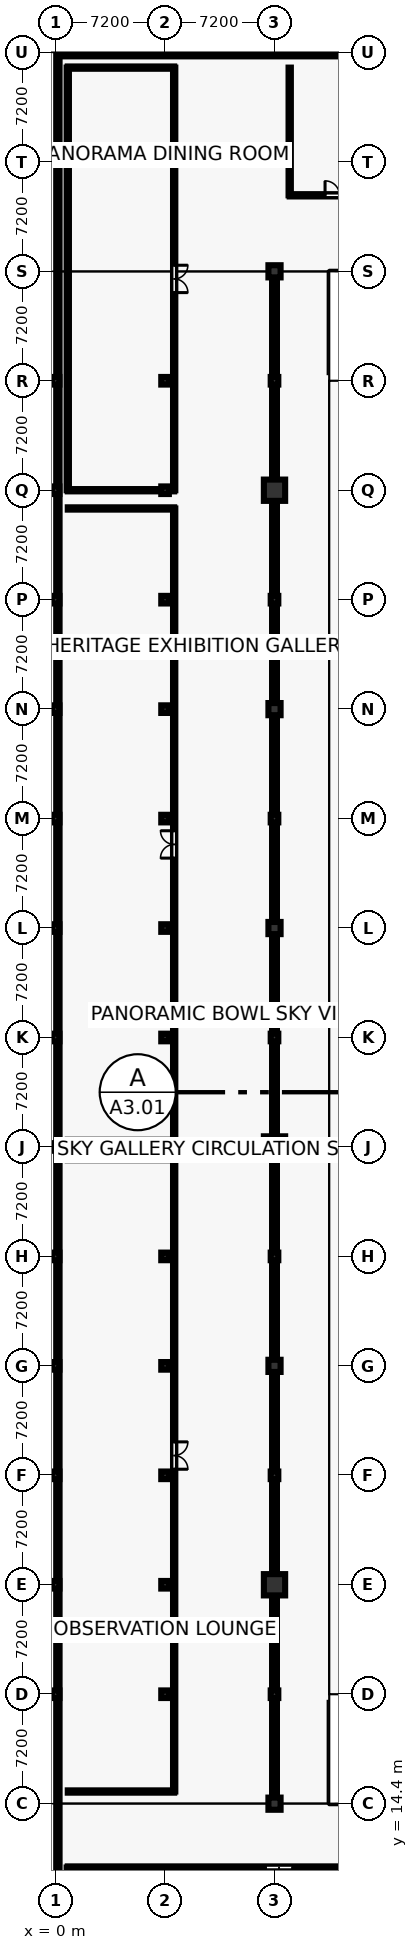
"""IFC4 building model, lengths in metres.
Left out: names, types, materials, properties, quantities, classifications, styles, units other than length and angle.
Written with IfcOpenShell. Run it as: python <this file> out.ifc"""

import sys

from ifc_helpers import new_model, si_unit, direction, frame, frame_2d, origin, origin_2d, place, context, subcontext, project, spatial, rectangle, circle, extrude, element, fill, save


model = new_model("IFC4")
c1 = context("Model", 3, precision=1e-05, world=origin(), true_north=direction((0.0, 1.0)))
c2 = subcontext(c1, "Body", "Model", "MODEL_VIEW")
j1 = project(units=[si_unit("LENGTHUNIT", "METRE"), si_unit("PLANEANGLEUNIT", "RADIAN")], contexts=[c1])
p1 = place(None, origin())
s1 = spatial("IfcSite", under=j1, at=p1, CompositionType="ELEMENT")
p2 = place(p1, origin())
s2 = spatial("IfcBuilding", under=s1, at=p2, CompositionType="ELEMENT")
p3 = place(p2, frame((0.0, 0.0, 23.0)))
s3 = spatial("IfcBuildingStorey", under=s2, at=p3, CompositionType="ELEMENT", Elevation=23.0)
for number, where, z_axis, x_axis in (
    (1, (0.0, 21.6, 0.0), (0.0, 0.0, 1.0), (1.0, 0.0, 0.0)),
    (2, (0.0, 28.8, 0.0), (0.0, 0.0, 1.0), (1.0, 0.0, 0.0)),
    (3, (0.0, 36.0, 0.0), (0.0, 0.0, 1.0), (1.0, 0.0, 0.0)),
    (4, (0.0, 43.2, 0.0), (0.0, 0.0, 1.0), (1.0, 0.0, 0.0)),
    (5, (0.0, 50.4, 0.0), (0.0, 0.0, 1.0), (1.0, 0.0, 0.0)),
    (6, (0.0, 57.6, 0.0), (0.0, 0.0, 1.0), (1.0, 0.0, 0.0)),
    (7, (0.0, 64.8, 0.0), (0.0, 0.0, 1.0), (1.0, 0.0, 0.0)),
    (8, (0.0, 72.0, 0.0), (0.0, 0.0, 1.0), (1.0, 0.0, 0.0)),
    (9, (0.0, 79.2, 0.0), (0.0, 0.0, 1.0), (1.0, 0.0, 0.0)),
    (10, (0.0, 86.4, 0.0), (0.0, 0.0, 1.0), (1.0, 0.0, 0.0)),
    (11, (0.0, 93.6, 0.0), (0.0, 0.0, 1.0), (1.0, 0.0, 0.0)),
    (12, (0.0, 100.8, 0.0), (0.0, 0.0, 1.0), (1.0, 0.0, 0.0)),
    (13, (0.0, 108.0, 0.0), (0.0, 0.0, 1.0), (1.0, 0.0, 0.0)),
    (14, (7.2, 21.6, 0.0), (0.0, 0.0, 1.0), (1.0, 0.0, 0.0)),
    (15, (7.2, 28.8, 0.0), (0.0, 0.0, 1.0), (1.0, 0.0, 0.0)),
    (16, (7.2, 36.0, 0.0), (0.0, 0.0, 1.0), (1.0, 0.0, 0.0)),
    (17, (7.2, 43.2, 0.0), (0.0, 0.0, 1.0), (1.0, 0.0, 0.0)),
    (18, (7.2, 50.4, 0.0), (0.0, 0.0, 1.0), (1.0, 0.0, 0.0)),
    (19, (7.2, 57.6, 0.0), (0.0, 0.0, 1.0), (1.0, 0.0, 0.0)),
    (20, (7.2, 64.8, 0.0), (0.0, 0.0, 1.0), (1.0, 0.0, 0.0)),
    (21, (7.2, 72.0, 0.0), (0.0, 0.0, 1.0), (1.0, 0.0, 0.0)),
    (22, (7.2, 79.2, 0.0), (0.0, 0.0, 1.0), (1.0, 0.0, 0.0)),
    (23, (7.2, 86.4, 0.0), (0.0, 0.0, 1.0), (1.0, 0.0, 0.0)),
    (24, (7.2, 93.6, 0.0), (0.0, 0.0, 1.0), (1.0, 0.0, 0.0)),
    (25, (7.2, 100.8, 0.0), (0.0, 0.0, 1.0), (1.0, 0.0, 0.0)),
    (26, (7.2, 108.0, 0.0), (0.0, 0.0, 1.0), (1.0, 0.0, 0.0)),
):
    element("IfcColumn", number, at=place(p3, frame(where, z_axis=z_axis, x_axis=x_axis)), inside=s3, PredefinedType="COLUMN", context=c2, shape_type="SweptSolid", body=[
        extrude(rectangle(XDim=0.5, YDim=0.5, at=origin_2d()), origin(), (0.0, 0.0, 1.0), 4.5),
    ])
p4 = place(p3, frame((14.4, 14.4, 0.0), z_axis=(0.0, 0.0, 1.0), x_axis=(1.0, 0.0, 0.0)))
e27 = element("IfcColumn", 27, at=p4, inside=s3, PredefinedType="COLUMN", context=c2, shape_type="SweptSolid", body=[
    extrude(circle(Radius=0.4, at=origin_2d()), origin(), (0.0, 0.0, 1.0), 5.92),
])
p5 = place(p3, frame((14.4, 21.6, 0.0), z_axis=(0.0, 0.0, 1.0), x_axis=(1.0, 0.0, 0.0)))
e28 = element("IfcColumn", 28, at=p5, inside=s3, PredefinedType="COLUMN", context=c2, shape_type="SweptSolid", body=[
    extrude(rectangle(XDim=0.5, YDim=0.5, at=origin_2d()), origin(), (0.0, 0.0, 1.0), 4.5),
])
p6 = place(p3, frame((14.4, 28.8, 0.0), z_axis=(0.0, 0.0, 1.0), x_axis=(1.0, 0.0, 0.0)))
e29 = element("IfcColumn", 29, at=p6, inside=s3, PredefinedType="COLUMN", context=c2, shape_type="SweptSolid", body=[
    extrude(circle(Radius=0.7, at=origin_2d()), origin(), (0.0, 0.0, 1.0), 4.75),
])
p7 = place(p3, frame((14.4, 36.0, 0.0), z_axis=(0.0, 0.0, 1.0), x_axis=(1.0, 0.0, 0.0)))
e30 = element("IfcColumn", 30, at=p7, inside=s3, PredefinedType="COLUMN", context=c2, shape_type="SweptSolid", body=[
    extrude(rectangle(XDim=0.5, YDim=0.5, at=origin_2d()), origin(), (0.0, 0.0, 1.0), 4.5),
])
p8 = place(p3, frame((14.4, 43.2, 0.0), z_axis=(0.0, 0.0, 1.0), x_axis=(1.0, 0.0, 0.0)))
e31 = element("IfcColumn", 31, at=p8, inside=s3, PredefinedType="COLUMN", context=c2, shape_type="SweptSolid", body=[
    extrude(circle(Radius=0.4, at=origin_2d()), origin(), (0.0, 0.0, 1.0), 4.75),
])
p9 = place(p3, frame((14.4, 50.4, 0.0), z_axis=(0.0, 0.0, 1.0), x_axis=(1.0, 0.0, 0.0)))
e32 = element("IfcColumn", 32, at=p9, inside=s3, PredefinedType="COLUMN", context=c2, shape_type="SweptSolid", body=[
    extrude(rectangle(XDim=0.5, YDim=0.5, at=origin_2d()), origin(), (0.0, 0.0, 1.0), 4.5),
])
p10 = place(p3, frame((14.4, 57.6, 0.0), z_axis=(0.0, 0.0, 1.0), x_axis=(1.0, 0.0, 0.0)))
e33 = element("IfcColumn", 33, at=p10, inside=s3, PredefinedType="COLUMN", context=c2, shape_type="SweptSolid", body=[
    extrude(circle(Radius=0.7, at=origin_2d()), origin(), (0.0, 0.0, 1.0), 4.75),
])
p11 = place(p3, frame((14.4, 64.8, 0.0), z_axis=(0.0, 0.0, 1.0), x_axis=(1.0, 0.0, 0.0)))
e34 = element("IfcColumn", 34, at=p11, inside=s3, PredefinedType="COLUMN", context=c2, shape_type="SweptSolid", body=[
    extrude(rectangle(XDim=0.5, YDim=0.5, at=origin_2d()), origin(), (0.0, 0.0, 1.0), 4.5),
])
p12 = place(p3, frame((14.4, 72.0, 0.0), z_axis=(0.0, 0.0, 1.0), x_axis=(1.0, 0.0, 0.0)))
e35 = element("IfcColumn", 35, at=p12, inside=s3, PredefinedType="COLUMN", context=c2, shape_type="SweptSolid", body=[
    extrude(circle(Radius=0.4, at=origin_2d()), origin(), (0.0, 0.0, 1.0), 4.75),
])
p13 = place(p3, frame((14.4, 79.2, 0.0), z_axis=(0.0, 0.0, 1.0), x_axis=(1.0, 0.0, 0.0)))
e36 = element("IfcColumn", 36, at=p13, inside=s3, PredefinedType="COLUMN", context=c2, shape_type="SweptSolid", body=[
    extrude(rectangle(XDim=0.5, YDim=0.5, at=origin_2d()), origin(), (0.0, 0.0, 1.0), 4.5),
])
p14 = place(p3, frame((14.4, 86.4, 0.0), z_axis=(0.0, 0.0, 1.0), x_axis=(1.0, 0.0, 0.0)))
e37 = element("IfcColumn", 37, at=p14, inside=s3, PredefinedType="COLUMN", context=c2, shape_type="SweptSolid", body=[
    extrude(circle(Radius=0.4, at=origin_2d()), origin(), (0.0, 0.0, 1.0), 4.75),
])
p15 = place(p3, frame((14.4, 93.6, 0.0), z_axis=(0.0, 0.0, 1.0), x_axis=(1.0, 0.0, 0.0)))
e38 = element("IfcColumn", 38, at=p15, inside=s3, PredefinedType="COLUMN", context=c2, shape_type="SweptSolid", body=[
    extrude(rectangle(XDim=0.5, YDim=0.5, at=origin_2d()), origin(), (0.0, 0.0, 1.0), 4.5),
])
p16 = place(p3, frame((14.4, 100.8, 0.0), z_axis=(0.0, 0.0, 1.0), x_axis=(1.0, 0.0, 0.0)))
e39 = element("IfcColumn", 39, at=p16, inside=s3, PredefinedType="COLUMN", context=c2, shape_type="SweptSolid", body=[
    extrude(circle(Radius=0.7, at=origin_2d()), origin(), (0.0, 0.0, 1.0), 4.75),
])
p17 = place(p3, frame((14.4, 108.0, 0.0), z_axis=(0.0, 0.0, 1.0), x_axis=(1.0, 0.0, 0.0)))
e40 = element("IfcColumn", 40, at=p17, inside=s3, PredefinedType="COLUMN", context=c2, shape_type="SweptSolid", body=[
    extrude(rectangle(XDim=0.5, YDim=0.5, at=origin_2d()), origin(), (0.0, 0.0, 1.0), 4.5),
])
p18 = place(p3, frame((14.4, 115.2, 0.0), z_axis=(0.0, 0.0, 1.0), x_axis=(1.0, 0.0, 0.0)))
e41 = element("IfcColumn", 41, at=p18, inside=s3, PredefinedType="COLUMN", context=c2, shape_type="SweptSolid", body=[
    extrude(circle(Radius=0.4, at=origin_2d()), origin(), (0.0, 0.0, 1.0), 5.92),
])
p19 = place(p3, frame((14.4, 14.75, 0.0), z_axis=(0.0, 0.0, 1.0), x_axis=(0.0, 1.0, 0.0)))
e42 = element("IfcWall", 42, at=p19, inside=s3, PredefinedType="SOLIDWALL", context=c2, shape_type="SweptSolid", body=[
    extrude(rectangle(XDim=13.7, YDim=0.32, at=frame_2d((6.85, 0.0))), origin(), (0.0, 0.0, 1.0), 3.34),
])
p20 = place(p3, frame((14.4, 29.15, 0.0), z_axis=(0.0, 0.0, 1.0), x_axis=(0.0, 1.0, 0.0)))
e43 = element("IfcWall", 43, at=p20, inside=s3, PredefinedType="SOLIDWALL", context=c2, shape_type="SweptSolid", body=[
    extrude(rectangle(XDim=13.7, YDim=0.32, at=frame_2d((6.85, 0.0))), origin(), (0.0, 0.0, 1.0), 3.34),
])
for number, where, z_axis, x_axis in (
    (44, (14.4, 43.55, 0.0), (0.0, 0.0, 1.0), (0.0, 1.0, 0.0)),
    (45, (14.4, 57.95, 0.0), (0.0, 0.0, 1.0), (0.0, 1.0, 0.0)),
    (46, (14.4, 72.35, 0.0), (0.0, 0.0, 1.0), (0.0, 1.0, 0.0)),
    (47, (14.4, 86.75, 0.0), (0.0, 0.0, 1.0), (0.0, 1.0, 0.0)),
):
    element("IfcWall", number, at=place(p3, frame(where, z_axis=z_axis, x_axis=x_axis)), inside=s3, PredefinedType="SOLIDWALL", context=c2, shape_type="SweptSolid", body=[
        extrude(rectangle(XDim=13.7, YDim=0.32, at=frame_2d((6.85, 0.0))), origin(), (0.0, 0.0, 1.0), 3.34),
    ])
p21 = place(p3, frame((14.4, 101.15, 0.0), z_axis=(0.0, 0.0, 1.0), x_axis=(0.0, 1.0, 0.0)))
e48 = element("IfcWall", 48, at=p21, inside=s3, PredefinedType="SOLIDWALL", context=c2, shape_type="SweptSolid", body=[
    extrude(rectangle(XDim=13.7, YDim=0.32, at=frame_2d((6.85, 0.0))), origin(), (0.0, 0.0, 1.0), 3.34),
])
p22 = place(p3, frame((0.15, 0.15, 4.5), z_axis=(0.0, 0.0, 1.0), x_axis=(0.0, 1.0, 0.0)))
e49 = element("IfcWall", 49, at=p22, inside=s3, PredefinedType="PARAPET", context=c2, shape_type="SweptSolid", body=[
    extrude(rectangle(XDim=129.3, YDim=0.22, at=frame_2d((64.65, 0.0))), origin(), (0.0, 0.0, 1.0), 1.15),
])
p23 = place(p3, frame((0.15, 129.45, 4.5), z_axis=(0.0, 0.0, 1.0), x_axis=(1.0, 0.0, 0.0)))
e50 = element("IfcWall", 50, at=p23, inside=s3, PredefinedType="PARAPET", context=c2, shape_type="SweptSolid", body=[
    extrude(rectangle(XDim=93.3, YDim=0.22, at=frame_2d((46.65, 0.0))), origin(), (0.0, 0.0, 1.0), 1.15),
])
p24 = place(p3, frame((0.8, 15.2, 0.0), z_axis=(0.0, 0.0, 1.0), x_axis=(1.0, 0.0, 0.0)))
e51 = element("IfcWall", 51, at=p24, inside=s3, PredefinedType="PARTITIONING", context=c2, shape_type="SweptSolid", body=[
    extrude(rectangle(XDim=7.0, YDim=0.15, at=frame_2d((3.5, 0.0))), origin(), (0.0, 0.0, 1.0), 3.34),
])
p25 = place(p3, frame((7.8, 15.2, 0.0), z_axis=(0.0, 0.0, 1.0), x_axis=(0.0, 1.0, 0.0)))
e52 = element("IfcWall", 52, at=p25, inside=s3, PredefinedType="PARTITIONING", context=c2, shape_type="SweptSolid", body=[
    extrude(rectangle(XDim=41.6, YDim=0.15, at=frame_2d((20.8, 0.0))), origin(), (0.0, 0.0, 1.0), 3.34),
])
p26 = place(p25, frame((21.2, 0.0, 0.0)))
e53 = element("IfcOpeningElement", 53, at=p26, cuts=e52, PredefinedType="OPENING", context=c2, shape_type="SweptSolid", body=[
    extrude(rectangle(XDim=1.8, YDim=2.3, at=frame_2d((0.9, 1.15))), frame((0.0, 0.085, 0.0), z_axis=(0.0, -1.0, 0.0), x_axis=(1.0, 0.0, 0.0)), (0.0, 0.0, 1.0), 0.17),
])
for number, where, z_axis, x_axis in (
    (54, (7.8, 56.8, 0.0), (0.0, 0.0, 1.0), (-1.0, 0.0, 0.0)),
    (55, (0.8, 58.0, 0.0), (0.0, 0.0, 1.0), (1.0, 0.0, 0.0)),
):
    element("IfcWall", number, at=place(p3, frame(where, z_axis=z_axis, x_axis=x_axis)), inside=s3, PredefinedType="PARTITIONING", context=c2, shape_type="SweptSolid", body=[
        extrude(rectangle(XDim=7.0, YDim=0.15, at=frame_2d((3.5, 0.0))), origin(), (0.0, 0.0, 1.0), 3.34),
    ])
p27 = place(p3, frame((7.8, 58.0, 0.0), z_axis=(0.0, 0.0, 1.0), x_axis=(0.0, 1.0, 0.0)))
e56 = element("IfcWall", 56, at=p27, inside=s3, PredefinedType="PARTITIONING", context=c2, shape_type="SweptSolid", body=[
    extrude(rectangle(XDim=41.6, YDim=0.15, at=frame_2d((20.8, 0.0))), origin(), (0.0, 0.0, 1.0), 3.34),
])
p28 = place(p27, frame((18.6, 0.0, 0.0)))
e57 = element("IfcOpeningElement", 57, at=p28, cuts=e56, PredefinedType="OPENING", context=c2, shape_type="SweptSolid", body=[
    extrude(rectangle(XDim=1.8, YDim=2.3, at=frame_2d((0.9, 1.15))), frame((0.0, 0.085, 0.0), z_axis=(0.0, -1.0, 0.0), x_axis=(1.0, 0.0, 0.0)), (0.0, 0.0, 1.0), 0.17),
])
for number, where, z_axis, x_axis in (
    (58, (7.8, 99.6, 0.0), (0.0, 0.0, 1.0), (-1.0, 0.0, 0.0)),
    (59, (0.8, 100.8, 0.0), (0.0, 0.0, 1.0), (1.0, 0.0, 0.0)),
):
    element("IfcWall", number, at=place(p3, frame(where, z_axis=z_axis, x_axis=x_axis)), inside=s3, PredefinedType="PARTITIONING", context=c2, shape_type="SweptSolid", body=[
        extrude(rectangle(XDim=7.0, YDim=0.15, at=frame_2d((3.5, 0.0))), origin(), (0.0, 0.0, 1.0), 3.34),
    ])
p29 = place(p3, frame((7.8, 100.8, 0.0), z_axis=(0.0, 0.0, 1.0), x_axis=(0.0, 1.0, 0.0)))
e60 = element("IfcWall", 60, at=p29, inside=s3, PredefinedType="PARTITIONING", context=c2, shape_type="SweptSolid", body=[
    extrude(rectangle(XDim=27.8, YDim=0.15, at=frame_2d((13.9, 0.0))), origin(), (0.0, 0.0, 1.0), 3.34),
])
p30 = place(p29, frame((13.0, 0.0, 0.0)))
e61 = element("IfcOpeningElement", 61, at=p30, cuts=e60, PredefinedType="OPENING", context=c2, shape_type="SweptSolid", body=[
    extrude(rectangle(XDim=1.8, YDim=2.3, at=frame_2d((0.9, 1.15))), frame((0.0, 0.085, 0.0), z_axis=(0.0, -1.0, 0.0), x_axis=(1.0, 0.0, 0.0)), (0.0, 0.0, 1.0), 0.17),
])
p31 = place(p3, frame((7.8, 128.6, 0.0), z_axis=(0.0, 0.0, 1.0), x_axis=(-1.0, 0.0, 0.0)))
e62 = element("IfcWall", 62, at=p31, inside=s3, PredefinedType="PARTITIONING", context=c2, shape_type="SweptSolid", body=[
    extrude(rectangle(XDim=7.0, YDim=0.15, at=frame_2d((3.5, 0.0))), origin(), (0.0, 0.0, 1.0), 3.34),
])
p32 = place(p3, frame((0.8, 128.6, 0.0), z_axis=(0.0, 0.0, 1.0), x_axis=(0.0, -1.0, 0.0)))
e63 = element("IfcWall", 63, at=p32, inside=s3, PredefinedType="PARTITIONING", context=c2, shape_type="SweptSolid", body=[
    extrude(rectangle(XDim=27.8, YDim=0.15, at=frame_2d((13.9, 0.0))), origin(), (0.0, 0.0, 1.0), 3.34),
])
p33 = place(p3, frame((28.6, 10.2, 0.0), z_axis=(0.0, 0.0, 1.0), x_axis=(-1.0, 0.0, 0.0)))
e64 = element("IfcWall", 64, at=p33, inside=s3, PredefinedType="PARTITIONING", context=c2, shape_type="SweptSolid", body=[
    extrude(rectangle(XDim=27.8, YDim=0.15, at=frame_2d((13.9, 0.0))), origin(), (0.0, 0.0, 1.0), 3.34),
])
p34 = place(p33, frame((13.0, 0.0, 0.0)))
e65 = element("IfcOpeningElement", 65, at=p34, cuts=e64, PredefinedType="OPENING", context=c2, shape_type="SweptSolid", body=[
    extrude(rectangle(XDim=1.8, YDim=2.3, at=frame_2d((0.9, 1.15))), frame((0.0, 0.085, 0.0), z_axis=(0.0, -1.0, 0.0), x_axis=(1.0, 0.0, 0.0)), (0.0, 0.0, 1.0), 0.17),
])
p35 = place(p3, frame((0.8, 10.2, 0.0), z_axis=(0.0, 0.0, 1.0), x_axis=(0.0, -1.0, 0.0)))
e66 = element("IfcWall", 66, at=p35, inside=s3, PredefinedType="PARTITIONING", context=c2, shape_type="SweptSolid", body=[
    extrude(rectangle(XDim=9.4, YDim=0.15, at=frame_2d((4.7, 0.0))), origin(), (0.0, 0.0, 1.0), 3.34),
])
p36 = place(p3, frame((15.4, 120.2, 0.0), z_axis=(0.0, 0.0, 1.0), x_axis=(1.0, 0.0, 0.0)))
e67 = element("IfcWall", 67, at=p36, inside=s3, PredefinedType="PARTITIONING", context=c2, shape_type="SweptSolid", body=[
    extrude(rectangle(XDim=5.6, YDim=0.15, at=frame_2d((2.8, 0.0))), origin(), (0.0, 0.0, 1.0), 3.34),
])
p37 = place(p36, frame((2.325, 0.0, 0.0)))
e68 = element("IfcOpeningElement", 68, at=p37, cuts=e67, PredefinedType="OPENING", context=c2, shape_type="SweptSolid", body=[
    extrude(rectangle(XDim=0.95, YDim=2.15, at=frame_2d((0.475, 1.075))), frame((0.0, 0.085, 0.0), z_axis=(0.0, -1.0, 0.0), x_axis=(1.0, 0.0, 0.0)), (0.0, 0.0, 1.0), 0.17),
])
p38 = place(p3, frame((15.4, 128.6, 0.0), z_axis=(0.0, 0.0, 1.0), x_axis=(0.0, -1.0, 0.0)))
e69 = element("IfcWall", 69, at=p38, inside=s3, PredefinedType="PARTITIONING", context=c2, shape_type="SweptSolid", body=[
    extrude(rectangle(XDim=8.4, YDim=0.15, at=frame_2d((4.2, 0.0))), origin(), (0.0, 0.0, 1.0), 3.34),
])
p39 = place(p26, frame((1.8, 0.0, 0.0), z_axis=(0.0, 0.0, 1.0), x_axis=(-1.0, 0.0, 0.0)))
e70 = element("IfcDoor", 70, at=p39, inside=s3, OperationType="DOUBLE_DOOR_SINGLE_SWING", PredefinedType="DOOR", context=c2, shape_type="SweptSolid", body=[
    extrude(rectangle(XDim=1.8, YDim=2.3, at=frame_2d((0.9, 1.15))), frame((0.0, 0.025, 0.0), z_axis=(0.0, -1.0, 0.0), x_axis=(1.0, 0.0, 0.0)), (0.0, 0.0, 1.0), 0.05),
])
fill(e53, e70)
p40 = place(p28, origin())
e71 = element("IfcDoor", 71, at=p40, inside=s3, OperationType="DOUBLE_DOOR_SINGLE_SWING", PredefinedType="DOOR", context=c2, shape_type="SweptSolid", body=[
    extrude(rectangle(XDim=1.8, YDim=2.3, at=frame_2d((0.9, 1.15))), frame((0.0, 0.025, 0.0), z_axis=(0.0, -1.0, 0.0), x_axis=(1.0, 0.0, 0.0)), (0.0, 0.0, 1.0), 0.05),
])
fill(e57, e71)
p41 = place(p30, frame((1.8, 0.0, 0.0), z_axis=(0.0, 0.0, 1.0), x_axis=(-1.0, 0.0, 0.0)))
e72 = element("IfcDoor", 72, at=p41, inside=s3, OperationType="DOUBLE_DOOR_SINGLE_SWING", PredefinedType="DOOR", context=c2, shape_type="SweptSolid", body=[
    extrude(rectangle(XDim=1.8, YDim=2.3, at=frame_2d((0.9, 1.15))), frame((0.0, 0.025, 0.0), z_axis=(0.0, -1.0, 0.0), x_axis=(1.0, 0.0, 0.0)), (0.0, 0.0, 1.0), 0.05),
])
fill(e61, e72)
p42 = place(p34, origin())
e73 = element("IfcDoor", 73, at=p42, inside=s3, OperationType="DOUBLE_DOOR_SINGLE_SWING", PredefinedType="DOOR", context=c2, shape_type="SweptSolid", body=[
    extrude(rectangle(XDim=1.8, YDim=2.3, at=frame_2d((0.9, 1.15))), frame((0.0, 0.025, 0.0), z_axis=(0.0, -1.0, 0.0), x_axis=(1.0, 0.0, 0.0)), (0.0, 0.0, 1.0), 0.05),
])
fill(e65, e73)
p43 = place(p37, origin())
e74 = element("IfcDoor", 74, at=p43, inside=s3, OperationType="SINGLE_SWING_LEFT", PredefinedType="DOOR", context=c2, shape_type="SweptSolid", body=[
    extrude(rectangle(XDim=0.95, YDim=2.15, at=frame_2d((0.475, 1.075))), frame((0.0, 0.025, 0.0), z_axis=(0.0, -1.0, 0.0), x_axis=(1.0, 0.0, 0.0)), (0.0, 0.0, 1.0), 0.05),
])
fill(e68, e74)
save(model, sys.argv[1])
